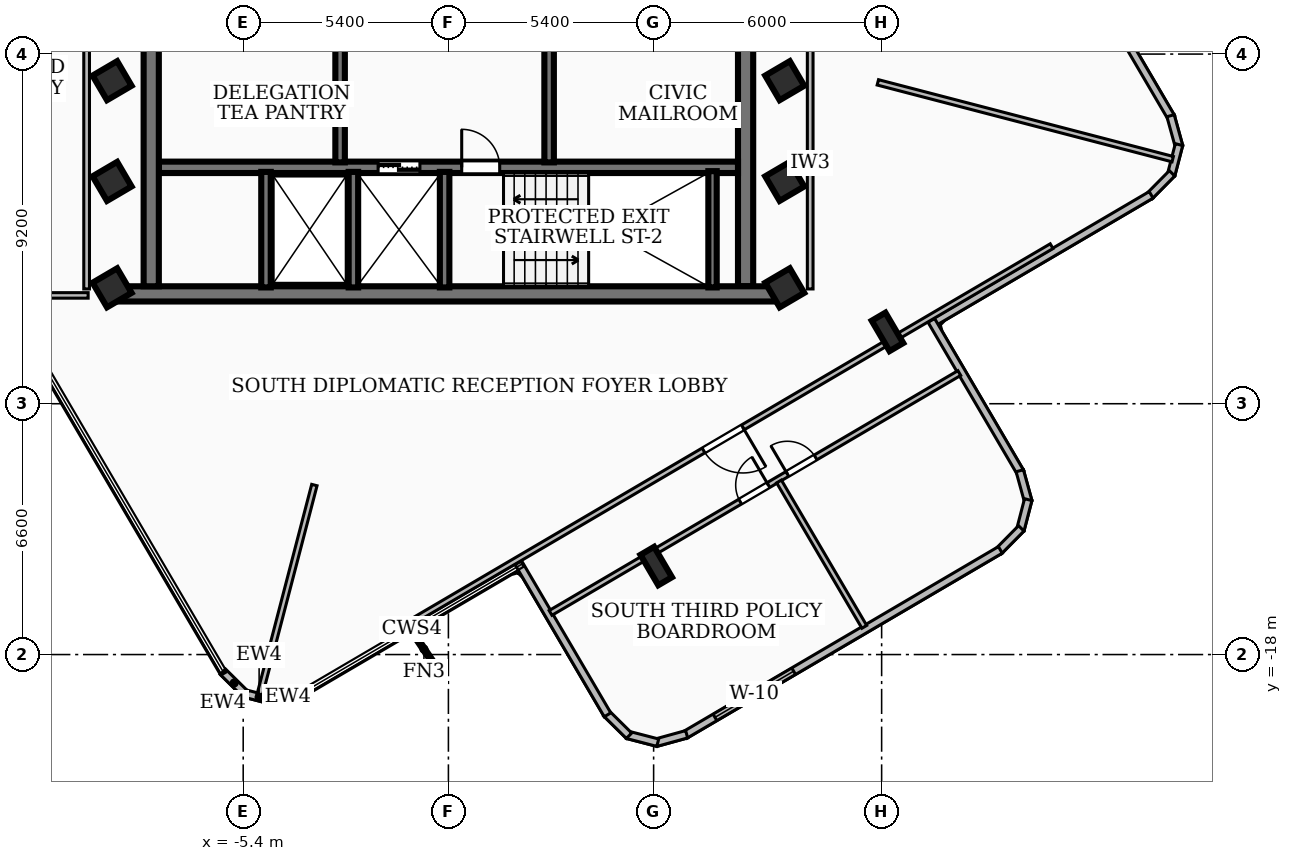
"""IFC4 building model, lengths in metres.
Left out: names, types, materials, properties, quantities, classifications, styles, units other than length and angle.
Written with IfcOpenShell. Run it as: python <this file> out.ifc"""

import sys

from ifc_helpers import new_model, si_unit, direction, frame, frame_2d, origin, origin_2d, place, context, subcontext, project, spatial, rectangle, i_section, extrude, element, fill, save


model = new_model("IFC4")
c1 = context("Model", 3, precision=1e-05, world=origin(), true_north=direction((0.0, 1.0)))
c2 = subcontext(c1, "Body", "Model", "MODEL_VIEW")
j1 = project(units=[si_unit("LENGTHUNIT", "METRE"), si_unit("PLANEANGLEUNIT", "RADIAN")], contexts=[c1])
p1 = place(None, origin())
s1 = spatial("IfcSite", under=j1, at=p1, CompositionType="ELEMENT")
p2 = place(p1, origin())
s2 = spatial("IfcBuilding", under=s1, at=p2, CompositionType="ELEMENT")
p3 = place(p2, frame((0.0, 0.0, 208.62)))
s3 = spatial("IfcBuildingStorey", under=s2, at=p3, CompositionType="ELEMENT", Elevation=208.62)
p4 = place(p3, frame((8.78, -8.51, 0.0), z_axis=(0.0, 0.0, 1.0), x_axis=(-1.0, 0.0, 0.0)))
e1 = element("IfcWall", 1, at=p4, inside=s3, PredefinedType="SHEAR", context=c2, shape_type="SweptSolid", body=[
    extrude(rectangle(XDim=17.56, YDim=0.4, at=frame_2d((8.78, 0.0))), origin(), (0.0, 0.0, 1.0), 3.16),
])
for number, where, z_axis, x_axis in (
    (2, (-7.82, -8.31, 0.0), (0.0, 0.0, 1.0), (0.0, 1.0, 0.0)),
    (3, (7.82, -1.95, 0.0), (0.0, 0.0, 1.0), (0.0, -1.0, 0.0)),
):
    element("IfcWall", number, at=place(p3, frame(where, z_axis=z_axis, x_axis=x_axis)), inside=s3, PredefinedType="SHEAR", context=c2, shape_type="SweptSolid", body=[
        extrude(rectangle(XDim=6.36, YDim=0.4, at=frame_2d((3.18, 0.0))), origin(), (0.0, 0.0, 1.0), 3.16),
    ])
p5 = place(p3, frame((-7.62, -5.18, 0.0), z_axis=(0.0, 0.0, 1.0), x_axis=(1.0, 0.0, 0.0)))
e4 = element("IfcWall", 4, at=p5, inside=s3, PredefinedType="SOLIDWALL", context=c2, shape_type="SweptSolid", body=[
    extrude(rectangle(XDim=15.24, YDim=0.3, at=frame_2d((7.62, 0.0))), origin(), (0.0, 0.0, 1.0), 3.16),
])
p6 = place(p5, frame((5.77, 0.0, 0.0)))
e5 = element("IfcOpeningElement", 5, at=p6, cuts=e4, PredefinedType="OPENING", context=c2, shape_type="SweptSolid", body=[
    extrude(rectangle(XDim=1.1, YDim=2.15, at=frame_2d((0.55, 1.075))), frame((0.0, 0.16, 0.0), z_axis=(0.0, -1.0, 0.0), x_axis=(1.0, 0.0, 0.0)), (0.0, 0.0, 1.0), 0.32),
])
p7 = place(p5, frame((7.97, 0.0, 0.0)))
e6 = element("IfcOpeningElement", 6, at=p7, cuts=e4, PredefinedType="OPENING", context=c2, shape_type="SweptSolid", body=[
    extrude(rectangle(XDim=1.0, YDim=2.1, at=frame_2d((0.5, 1.05))), frame((0.0, 0.16, 0.0), z_axis=(0.0, -1.0, 0.0), x_axis=(1.0, 0.0, 0.0)), (0.0, 0.0, 1.0), 0.32),
])
p8 = place(p3, frame((6.95, -8.34, 0.0), z_axis=(0.0, 0.0, 1.0), x_axis=(0.0, 1.0, 0.0)))
e7 = element("IfcWall", 7, at=p8, inside=s3, PredefinedType="SOLIDWALL", context=c2, shape_type="SweptSolid", body=[
    extrude(rectangle(XDim=3.06, YDim=0.22, at=frame_2d((1.53, 0.0))), origin(), (0.0, 0.0, 1.0), 3.16),
])
for number, where, z_axis, x_axis in (
    (8, (-0.1, -8.34, 0.0), (0.0, 0.0, 1.0), (0.0, 1.0, 0.0)),
    (9, (-2.5, -8.34, 0.0), (0.0, 0.0, 1.0), (0.0, 1.0, 0.0)),
    (10, (-4.8, -8.34, 0.0), (0.0, 0.0, 1.0), (0.0, 1.0, 0.0)),
):
    element("IfcWall", number, at=place(p3, frame(where, z_axis=z_axis, x_axis=x_axis)), inside=s3, PredefinedType="SOLIDWALL", context=c2, shape_type="SweptSolid", body=[
        extrude(rectangle(XDim=3.04, YDim=0.25, at=frame_2d((1.52, 0.0))), origin(), (0.0, 0.0, 1.0), 3.16),
    ])
for number, where, z_axis, x_axis in (
    (11, (-2.85, -5.05, 0.0), (0.0, 0.0, 1.0), (0.0, 1.0, 0.0)),
    (12, (2.65, -5.05, 0.0), (0.0, 0.0, 1.0), (0.0, 1.0, 0.0)),
):
    element("IfcWall", number, at=place(p3, frame(where, z_axis=z_axis, x_axis=x_axis)), inside=s3, PredefinedType="SOLIDWALL", context=c2, shape_type="SweptSolid", body=[
        extrude(rectangle(XDim=3.07, YDim=0.25, at=frame_2d((1.535, 0.0))), origin(), (0.0, 0.0, 1.0), 3.16),
    ])
for number, where, z_axis, x_axis in (
    (13, (-8.85, -5.55, 0.0), (0.0, 0.0, 1.0), (0.863, 0.506, 0.0)),
    (14, (-8.85, -2.9, 0.0), (0.0, 0.0, 1.0), (0.863, 0.506, 0.0)),
    (15, (8.85, -5.55, 0.0), (0.0, 0.0, 1.0), (0.863, 0.506, 0.0)),
    (16, (8.85, -2.9, 0.0), (0.0, 0.0, 1.0), (0.863, 0.506, 0.0)),
    (17, (8.85, -8.35, 0.0), (0.0, 0.0, 1.0), (0.863, 0.506, 0.0)),
    (18, (-8.85, -8.35, 0.0), (0.0, 0.0, 1.0), (0.863, 0.506, 0.0)),
):
    element("IfcColumn", number, at=place(p3, frame(where, z_axis=z_axis, x_axis=x_axis)), inside=s3, PredefinedType="COLUMN", context=c2, shape_type="SweptSolid", body=[
        extrude(rectangle(XDim=0.75, YDim=0.75, at=origin_2d()), origin(), (0.0, 0.0, 1.0), 3.42),
    ])
for number, where, z_axis, x_axis in (
    (19, (5.468, -15.671, 0.0), (0.0, 0.0, 1.0), (0.863, 0.506, 0.0)),
    (20, (11.554, -9.51, 0.0), (0.0, 0.0, 1.0), (0.863, 0.506, 0.0)),
):
    element("IfcColumn", number, at=place(p3, frame(where, z_axis=z_axis, x_axis=x_axis)), inside=s3, PredefinedType="COLUMN", context=c2, shape_type="SweptSolid", body=[
        extrude(i_section(OverallWidth=0.418, OverallDepth=0.927, WebThickness=0.019, FlangeThickness=0.032, at=origin_2d()), origin(), (0.0, 0.0, 1.0), 3.42),
    ])
p9 = place(p3, frame((-3.822, -19.003, 0.0), z_axis=(0.0, 0.0, 1.0), x_axis=(-0.963905015631, -0.266246353668, 0.0)))
e21 = element("IfcWall", 21, at=p9, inside=s3, PredefinedType="SOLIDWALL", context=c2, shape_type="SweptSolid", body=[
    extrude(rectangle(XDim=0.838, YDim=0.2, at=frame_2d((0.419, 0.0))), origin(), (0.0, 0.0, 1.0), 3.16),
])
p10 = place(p3, frame((-4.582, -19.225, 0.0), z_axis=(0.0, 0.0, 1.0), x_axis=(-0.967943577658, 0.251167733737, 0.0)))
e22 = element("IfcWall", 22, at=p10, inside=s3, PredefinedType="SOLIDWALL", context=c2, shape_type="SweptSolid", body=[
    extrude(rectangle(XDim=0.824, YDim=0.2, at=frame_2d((0.412, 0.0))), origin(), (0.0, 0.0, 1.0), 3.16),
])
p11 = place(p3, frame((-5.338, -19.042, 0.0), z_axis=(0.0, 0.0, 1.0), x_axis=(-0.711310891957, 0.702877524881, 0.0)))
e23 = element("IfcWall", 23, at=p11, inside=s3, PredefinedType="SOLIDWALL", context=c2, shape_type="SweptSolid", body=[
    extrude(rectangle(XDim=0.84, YDim=0.2, at=frame_2d((0.42, 0.0))), origin(), (0.0, 0.0, 1.0), 3.16),
])
p12 = place(p3, frame((15.611, 1.948, 0.0), z_axis=(0.0, 0.0, 1.0), x_axis=(0.505999167705, -0.862533965872, 0.0)))
e24 = element("IfcWall", 24, at=p12, inside=s3, PredefinedType="SOLIDWALL", context=c2, shape_type="SweptSolid", body=[
    extrude(rectangle(XDim=6.743, YDim=0.2, at=frame_2d((3.372, 0.0))), origin(), (0.0, 0.0, 1.0), 3.16),
])
p13 = place(p3, frame((19.003, -3.822, 0.0), z_axis=(0.0, 0.0, 1.0), x_axis=(0.266246353668, -0.963905015631, 0.0)))
e25 = element("IfcWall", 25, at=p13, inside=s3, PredefinedType="SOLIDWALL", context=c2, shape_type="SweptSolid", body=[
    extrude(rectangle(XDim=0.838, YDim=0.2, at=frame_2d((0.419, 0.0))), origin(), (0.0, 0.0, 1.0), 3.16),
])
p14 = place(p3, frame((19.225, -4.582, 0.0), z_axis=(0.0, 0.0, 1.0), x_axis=(-0.251167733737, -0.967943577658, 0.0)))
e26 = element("IfcWall", 26, at=p14, inside=s3, PredefinedType="SOLIDWALL", context=c2, shape_type="SweptSolid", body=[
    extrude(rectangle(XDim=0.824, YDim=0.2, at=frame_2d((0.412, 0.0))), origin(), (0.0, 0.0, 1.0), 3.16),
])
p15 = place(p3, frame((19.042, -5.338, 0.0), z_axis=(0.0, 0.0, 1.0), x_axis=(-0.702877524881, -0.711310891957, 0.0)))
e27 = element("IfcWall", 27, at=p15, inside=s3, PredefinedType="SOLIDWALL", context=c2, shape_type="SweptSolid", body=[
    extrude(rectangle(XDim=0.84, YDim=0.2, at=frame_2d((0.42, 0.0))), origin(), (0.0, 0.0, 1.0), 3.16),
])
p16 = place(p3, frame((18.492, -5.904, 0.0), z_axis=(0.0, 0.0, 1.0), x_axis=(-0.86245977502, -0.506125613333, 0.0)))
e28 = element("IfcWall", 28, at=p16, inside=s3, PredefinedType="SOLIDWALL", context=c2, shape_type="SweptSolid", body=[
    extrude(rectangle(XDim=6.741, YDim=0.2, at=frame_2d((3.371, 0.0))), origin(), (0.0, 0.0, 1.0), 3.16),
])
p17 = place(p3, frame((12.707, -9.207, 0.0), z_axis=(0.0, 0.0, 1.0), x_axis=(0.505936854923, -0.862570518178, 0.0)))
e29 = element("IfcWall", 29, at=p17, inside=s3, PredefinedType="SOLIDWALL", context=c2, shape_type="SweptSolid", body=[
    extrude(rectangle(XDim=4.641, YDim=0.2, at=frame_2d((2.32, 0.0))), origin(), (0.0, 0.0, 1.0), 3.16),
])
p18 = place(p3, frame((15.035, -13.164, 0.0), z_axis=(0.0, 0.0, 1.0), x_axis=(0.266246353668, -0.963905015631, 0.0)))
e30 = element("IfcWall", 30, at=p18, inside=s3, PredefinedType="SOLIDWALL", context=c2, shape_type="SweptSolid", body=[
    extrude(rectangle(XDim=0.838, YDim=0.2, at=frame_2d((0.419, 0.0))), origin(), (0.0, 0.0, 1.0), 3.16),
])
p19 = place(p3, frame((15.257, -13.924, 0.0), z_axis=(0.0, 0.0, 1.0), x_axis=(-0.251167733737, -0.967943577658, 0.0)))
e31 = element("IfcWall", 31, at=p19, inside=s3, PredefinedType="SOLIDWALL", context=c2, shape_type="SweptSolid", body=[
    extrude(rectangle(XDim=0.824, YDim=0.2, at=frame_2d((0.412, 0.0))), origin(), (0.0, 0.0, 1.0), 3.16),
])
p20 = place(p3, frame((15.074, -14.68, 0.0), z_axis=(0.0, 0.0, 1.0), x_axis=(-0.702877524881, -0.711310891957, 0.0)))
e32 = element("IfcWall", 32, at=p20, inside=s3, PredefinedType="SOLIDWALL", context=c2, shape_type="SweptSolid", body=[
    extrude(rectangle(XDim=0.84, YDim=0.2, at=frame_2d((0.42, 0.0))), origin(), (0.0, 0.0, 1.0), 3.16),
])
p21 = place(p3, frame((14.524, -15.246, 0.0), z_axis=(0.0, 0.0, 1.0), x_axis=(-0.862483422861, -0.506085314241, 0.0)))
e33 = element("IfcWall", 33, at=p21, inside=s3, PredefinedType="SOLIDWALL", context=c2, shape_type="SweptSolid", body=[
    extrude(rectangle(XDim=9.625, YDim=0.2, at=frame_2d((4.812, 0.0))), origin(), (0.0, 0.0, 1.0), 3.16),
])
p22 = place(p21, frame((6.307, 0.0, 0.85)))
e34 = element("IfcOpeningElement", 34, at=p22, cuts=e33, PredefinedType="OPENING", context=c2, shape_type="SweptSolid", body=[
    extrude(rectangle(XDim=2.4, YDim=1.65, at=frame_2d((1.2, 0.825))), frame((0.0, 0.11, 0.0), z_axis=(0.0, -1.0, 0.0), x_axis=(1.0, 0.0, 0.0)), (0.0, 0.0, 1.0), 0.22),
])
p23 = place(p3, frame((6.269, -20.097, 0.0), z_axis=(0.0, 0.0, 1.0), x_axis=(-0.963925656212, -0.266171616247, 0.0)))
e35 = element("IfcWall", 35, at=p23, inside=s3, PredefinedType="SOLIDWALL", context=c2, shape_type="SweptSolid", body=[
    extrude(rectangle(XDim=0.838, YDim=0.2, at=frame_2d((0.419, 0.0))), origin(), (0.0, 0.0, 1.0), 3.16),
])
p24 = place(p3, frame((5.509, -20.319, 0.0), z_axis=(0.0, 0.0, 1.0), x_axis=(-0.967962254737, 0.251095745493, 0.0)))
e36 = element("IfcWall", 36, at=p24, inside=s3, PredefinedType="SOLIDWALL", context=c2, shape_type="SweptSolid", body=[
    extrude(rectangle(XDim=0.824, YDim=0.2, at=frame_2d((0.412, 0.0))), origin(), (0.0, 0.0, 1.0), 3.16),
])
p25 = place(p3, frame((4.753, -20.136, 0.0), z_axis=(0.0, 0.0, 1.0), x_axis=(-0.711167178618, 0.70302293281, 0.0)))
e37 = element("IfcWall", 37, at=p25, inside=s3, PredefinedType="SOLIDWALL", context=c2, shape_type="SweptSolid", body=[
    extrude(rectangle(XDim=0.839, YDim=0.2, at=frame_2d((0.42, 0.0))), origin(), (0.0, 0.0, 1.0), 3.16),
])
p26 = place(p3, frame((4.187, -19.586, 0.0), z_axis=(0.0, 0.0, 1.0), x_axis=(-0.505936854923, 0.862570518178, 0.0)))
e38 = element("IfcWall", 38, at=p26, inside=s3, PredefinedType="SOLIDWALL", context=c2, shape_type="SweptSolid", body=[
    extrude(rectangle(XDim=4.641, YDim=0.2, at=frame_2d((2.32, 0.0))), origin(), (0.0, 0.0, 1.0), 3.16),
])
for number, where, z_axis, x_axis in (
    (39, (-9.52, -8.38, 0.0), (0.0, 0.0, 1.0), (0.0, 1.0, 0.0)),
    (40, (9.52, -8.38, 0.0), (0.0, 0.0, 1.0), (0.0, 1.0, 0.0)),
):
    element("IfcWall", number, at=place(p3, frame(where, z_axis=z_axis, x_axis=x_axis)), inside=s3, PredefinedType="PARTITIONING", context=c2, shape_type="SweptSolid", body=[
        extrude(rectangle(XDim=6.63, YDim=0.15, at=frame_2d((3.315, 0.0))), origin(), (0.0, 0.0, 1.0), 3.16),
    ])
p27 = place(p3, frame((-11.662, -8.55, 0.0), z_axis=(0.0, 0.0, 1.0), x_axis=(1.0, 0.0, 0.0)))
e41 = element("IfcWall", 41, at=p27, inside=s3, PredefinedType="PARTITIONING", context=c2, shape_type="SweptSolid", body=[
    extrude(rectangle(XDim=2.182, YDim=0.145, at=frame_2d((1.091, 0.0))), origin(), (0.0, 0.0, 1.0), 3.16),
])
p28 = place(p3, frame((-3.527, -13.54, 0.0), z_axis=(0.0, 0.0, 1.0), x_axis=(-0.252132617321, -0.967692690519, 0.0)))
e42 = element("IfcWall", 42, at=p28, inside=s3, PredefinedType="PARTITIONING", context=c2, shape_type="SweptSolid", body=[
    extrude(rectangle(XDim=5.703, YDim=0.145, at=frame_2d((2.852, 0.0))), origin(), (0.0, 0.0, 1.0), 3.16),
])
p29 = place(p3, frame((11.3, -2.944, 0.0), z_axis=(0.0, 0.0, 1.0), x_axis=(0.967711624716, -0.252059936106, 0.0)))
e43 = element("IfcWall", 43, at=p29, inside=s3, PredefinedType="PARTITIONING", context=c2, shape_type="SweptSolid", body=[
    extrude(rectangle(XDim=8.018, YDim=0.145, at=frame_2d((4.009, 0.0))), origin(), (0.0, 0.0, 1.0), 3.16),
])
p30 = place(p3, frame((15.873, -7.255, 0.0), z_axis=(0.0, 0.0, 1.0), x_axis=(-0.862498672631, -0.506059324299, 0.0)))
e44 = element("IfcWall", 44, at=p30, inside=s3, PredefinedType="PARTITIONING", context=c2, shape_type="SweptSolid", body=[
    extrude(rectangle(XDim=20.039, YDim=0.145, at=frame_2d((10.02, 0.0))), origin(), (0.0, 0.0, 1.0), 2.53),
])
p31 = place(p30, frame((9.42, 0.0, 0.0)))
e45 = element("IfcOpeningElement", 45, at=p31, cuts=e44, PredefinedType="OPENING", context=c2, shape_type="SweptSolid", body=[
    extrude(rectangle(XDim=1.2, YDim=2.1, at=frame_2d((0.6, 1.05))), frame((0.0, 0.083, 0.0), z_axis=(0.0, -1.0, 0.0), x_axis=(1.0, 0.0, 0.0)), (0.0, 0.0, 1.0), 0.165),
])
p32 = place(p3, frame((8.7, -13.446, 0.0), z_axis=(0.0, 0.0, 1.0), x_axis=(0.506043007476, -0.862508246097, 0.0)))
e46 = element("IfcWall", 46, at=p32, inside=s3, PredefinedType="PARTITIONING", context=c2, shape_type="SweptSolid", body=[
    extrude(rectangle(XDim=4.435, YDim=0.145, at=frame_2d((2.217, 0.0))), origin(), (0.0, 0.0, 1.0), 3.16),
])
p33 = place(p3, frame((2.688, -16.904, 0.0), z_axis=(0.0, 0.0, 1.0), x_axis=(0.862497334811, 0.506061604396, 0.0)))
e47 = element("IfcWall", 47, at=p33, inside=s3, PredefinedType="PARTITIONING", context=c2, shape_type="SweptSolid", body=[
    extrude(rectangle(XDim=12.471, YDim=0.145, at=frame_2d((6.235, 0.0))), origin(), (0.0, 0.0, 1.0), 2.53),
])
p34 = place(p33, frame((5.785, 0.0, 0.0)))
e48 = element("IfcOpeningElement", 48, at=p34, cuts=e47, PredefinedType="OPENING", context=c2, shape_type="SweptSolid", body=[
    extrude(rectangle(XDim=0.86, YDim=2.04, at=frame_2d((0.43, 1.02))), frame((0.0, 0.083, 0.0), z_axis=(0.0, -1.0, 0.0), x_axis=(1.0, 0.0, 0.0)), (0.0, 0.0, 1.0), 0.165),
])
p35 = place(p33, frame((7.225, 0.0, 0.0)))
e49 = element("IfcOpeningElement", 49, at=p35, cuts=e47, PredefinedType="OPENING", context=c2, shape_type="SweptSolid", body=[
    extrude(rectangle(XDim=0.86, YDim=2.04, at=frame_2d((0.43, 1.02))), frame((0.0, 0.083, 0.0), z_axis=(0.0, -1.0, 0.0), x_axis=(1.0, 0.0, 0.0)), (0.0, 0.0, 1.0), 0.165),
])
p36 = place(p22, origin())
e50 = element("IfcWindow", 50, at=p36, inside=s3, PartitioningType="SINGLE_PANEL", PredefinedType="WINDOW", context=c2, shape_type="SweptSolid", body=[
    extrude(rectangle(XDim=2.4, YDim=1.65, at=frame_2d((1.2, 0.825))), frame((0.0, 0.03, 0.0), z_axis=(0.0, -1.0, 0.0), x_axis=(1.0, 0.0, 0.0)), (0.0, 0.0, 1.0), 0.06),
])
fill(e34, e50)
p37 = place(p6, origin())
e51 = element("IfcDoor", 51, at=p37, inside=s3, OperationType="DOUBLE_DOOR_SLIDING", PredefinedType="DOOR", context=c2, shape_type="SweptSolid", body=[
    extrude(rectangle(XDim=1.1, YDim=2.15, at=frame_2d((0.55, 1.075))), frame((0.0, 0.025, 0.0), z_axis=(0.0, -1.0, 0.0), x_axis=(1.0, 0.0, 0.0)), (0.0, 0.0, 1.0), 0.05),
])
fill(e5, e51)
p38 = place(p7, origin())
e52 = element("IfcDoor", 52, at=p38, inside=s3, OperationType="SINGLE_SWING_LEFT", PredefinedType="DOOR", context=c2, shape_type="SweptSolid", body=[
    extrude(rectangle(XDim=1.0, YDim=2.1, at=frame_2d((0.5, 1.05))), frame((0.0, 0.025, 0.0), z_axis=(0.0, -1.0, 0.0), x_axis=(1.0, 0.0, 0.0)), (0.0, 0.0, 1.0), 0.05),
])
fill(e6, e52)
p39 = place(p31, origin())
e53 = element("IfcDoor", 53, at=p39, inside=s3, OperationType="SINGLE_SWING_LEFT", PredefinedType="DOOR", context=c2, shape_type="SweptSolid", body=[
    extrude(rectangle(XDim=1.2, YDim=2.1, at=frame_2d((0.6, 1.05))), frame((0.0, 0.025, 0.0), z_axis=(0.0, -1.0, 0.0), x_axis=(1.0, 0.0, 0.0)), (0.0, 0.0, 1.0), 0.05),
])
fill(e45, e53)
p40 = place(p34, origin())
e54 = element("IfcDoor", 54, at=p40, inside=s3, OperationType="SINGLE_SWING_RIGHT", PredefinedType="DOOR", context=c2, shape_type="SweptSolid", body=[
    extrude(rectangle(XDim=0.86, YDim=2.04, at=frame_2d((0.43, 1.02))), frame((0.0, 0.025, 0.0), z_axis=(0.0, -1.0, 0.0), x_axis=(1.0, 0.0, 0.0)), (0.0, 0.0, 1.0), 0.05),
])
fill(e48, e54)
p41 = place(p35, origin())
e55 = element("IfcDoor", 55, at=p41, inside=s3, OperationType="SINGLE_SWING_LEFT", PredefinedType="DOOR", context=c2, shape_type="SweptSolid", body=[
    extrude(rectangle(XDim=0.86, YDim=2.04, at=frame_2d((0.43, 1.02))), frame((0.0, 0.025, 0.0), z_axis=(0.0, -1.0, 0.0), x_axis=(1.0, 0.0, 0.0)), (0.0, 0.0, 1.0), 0.05),
])
fill(e49, e55)
save(model, sys.argv[1])
